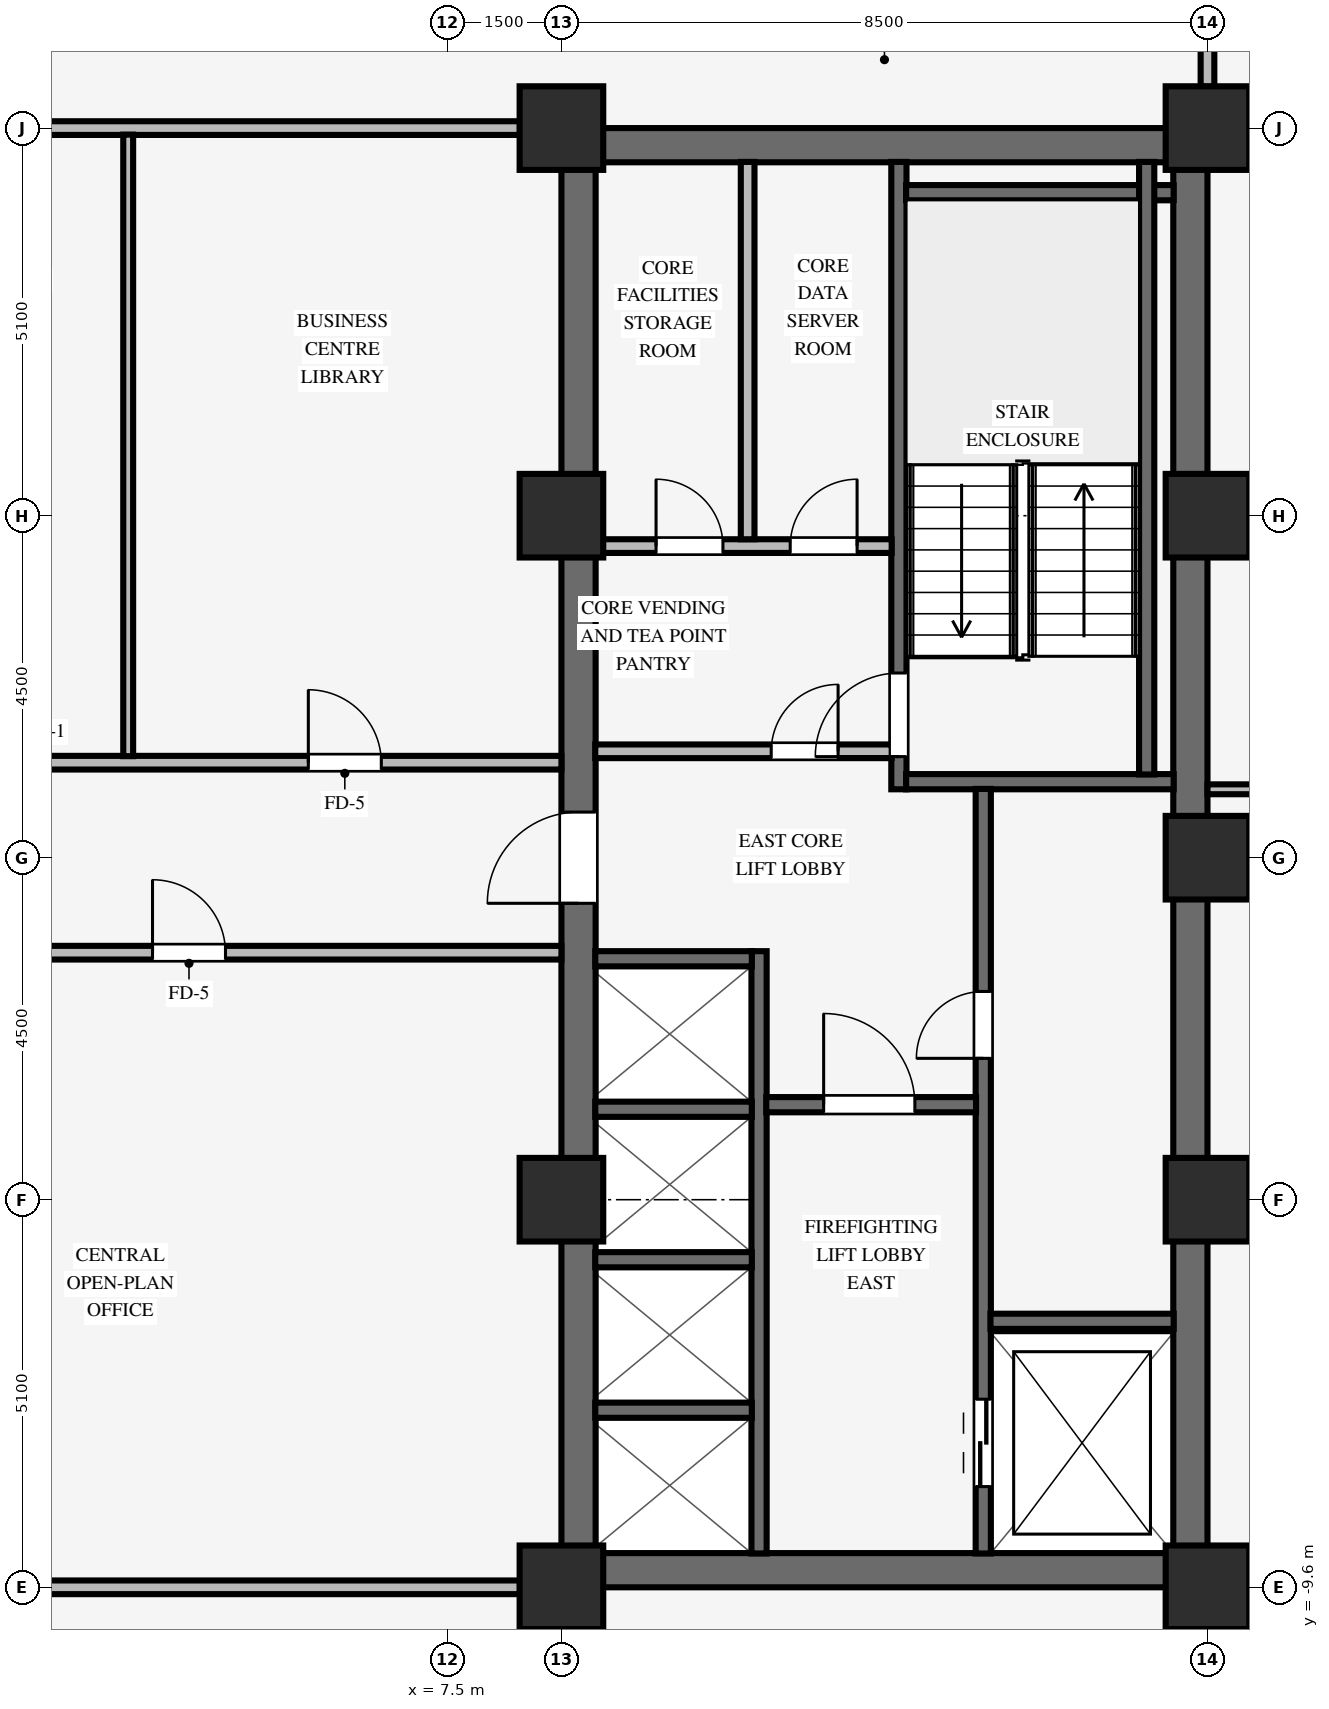
"""IFC4 building model, lengths in metres.
Left out: names, types, materials, properties, quantities, classifications, styles, units other than length and angle.
Written with IfcOpenShell. Run it as: python <this file> out.ifc"""

import sys

from ifc_helpers import new_model, si_unit, direction, frame, frame_2d, origin, origin_2d, place, context, subcontext, project, spatial, rectangle, extrude, source, transform, mapped, element, fill, save


model = new_model("IFC4")
c1 = context("Model", 3, precision=1e-05, world=origin(), true_north=direction((0.0, 1.0)))
c2 = subcontext(c1, "Body", "Model", "MODEL_VIEW")
j1 = project(units=[si_unit("LENGTHUNIT", "METRE"), si_unit("PLANEANGLEUNIT", "RADIAN")], contexts=[c1])
p1 = place(None, origin())
s1 = spatial("IfcSite", under=j1, at=p1, CompositionType="ELEMENT")
p2 = place(p1, origin())
s2 = spatial("IfcBuilding", under=s1, at=p2, CompositionType="ELEMENT")
p3 = place(p2, frame((0.0, 0.0, 86.0)))
s3 = spatial("IfcBuildingStorey", under=s2, at=p3, CompositionType="ELEMENT", Elevation=86.0)
for number, where, z_axis, x_axis in (
    (1, (9.0, -9.375, 0.0), (0.0, 0.0, 1.0), (1.0, 0.0, 0.0)),
    (2, (9.0, 9.375, 0.0), (0.0, 0.0, 1.0), (1.0, 0.0, 0.0)),
):
    element("IfcWall", number, at=place(p3, frame(where, z_axis=z_axis, x_axis=x_axis)), inside=s3, PredefinedType="SHEAR", context=c2, shape_type="SweptSolid", body=[
        extrude(rectangle(XDim=8.5, YDim=0.45, at=frame_2d((4.25, 0.0))), origin(), (0.0, 0.0, 1.0), 3.37),
    ])
p4 = place(p3, frame((9.225, -9.155, 0.0), z_axis=(0.0, 0.0, 1.0), x_axis=(0.0, 1.0, 0.0)))
e3 = element("IfcWall", 3, at=p4, inside=s3, PredefinedType="SHEAR", context=c2, shape_type="SweptSolid", body=[
    extrude(rectangle(XDim=18.31, YDim=0.45, at=frame_2d((9.155, 0.0))), origin(), (0.0, 0.0, 1.0), 3.37),
])
p5 = place(p4, frame((8.555, 0.0, 0.0)))
e4 = element("IfcOpeningElement", 4, at=p5, cuts=e3, PredefinedType="OPENING", context=c2, shape_type="SweptSolid", body=[
    extrude(rectangle(XDim=1.2, YDim=2.15, at=frame_2d((0.6, 1.075))), frame((0.0, 0.235, 0.0), z_axis=(0.0, -1.0, 0.0), x_axis=(1.0, 0.0, 0.0)), (0.0, 0.0, 1.0), 0.47),
])
p6 = place(p3, frame((17.275, -9.155, 0.0), z_axis=(0.0, 0.0, 1.0), x_axis=(0.0, 1.0, 0.0)))
e5 = element("IfcWall", 5, at=p6, inside=s3, PredefinedType="SHEAR", context=c2, shape_type="SweptSolid", body=[
    extrude(rectangle(XDim=18.31, YDim=0.45, at=frame_2d((9.155, 0.0))), origin(), (0.0, 0.0, 1.0), 3.37),
])
for number, where, z_axis, x_axis in (
    (6, (9.0, -9.6, 0.0), (0.0, 0.0, 1.0), (1.0, 0.0, 0.0)),
    (7, (9.0, -4.5, 0.0), (0.0, 0.0, 1.0), (1.0, 0.0, 0.0)),
    (8, (9.0, 4.5, 0.0), (0.0, 0.0, 1.0), (1.0, 0.0, 0.0)),
    (9, (9.0, 9.6, 0.0), (0.0, 0.0, 1.0), (1.0, 0.0, 0.0)),
    (10, (17.5, -9.6, 0.0), (0.0, 0.0, 1.0), (1.0, 0.0, 0.0)),
    (11, (17.5, -4.5, 0.0), (0.0, 0.0, 1.0), (1.0, 0.0, 0.0)),
    (12, (17.5, 4.5, 0.0), (0.0, 0.0, 1.0), (1.0, 0.0, 0.0)),
    (13, (17.5, 9.6, 0.0), (0.0, 0.0, 1.0), (1.0, 0.0, 0.0)),
    (14, (17.5, 0.0, 0.0), (0.0, 0.0, 1.0), (1.0, 0.0, 0.0)),
):
    element("IfcColumn", number, at=place(p3, frame(where, z_axis=z_axis, x_axis=x_axis)), inside=s3, PredefinedType="COLUMN", context=c2, shape_type="SweptSolid", body=[
        extrude(rectangle(XDim=1.1, YDim=1.1, at=origin_2d()), origin(), (0.0, 0.0, 1.0), 3.37),
    ])
p7 = place(p3, frame((13.44, 0.9, 0.0), z_axis=(0.0, 0.0, 1.0), x_axis=(0.0, 1.0, 0.0)))
e15 = element("IfcWall", 15, at=p7, inside=s3, PredefinedType="SHEAR", context=c2, shape_type="SweptSolid", body=[
    extrude(rectangle(XDim=8.255, YDim=0.2, at=frame_2d((4.127, 0.0))), origin(), (0.0, 0.0, 1.0), 3.37),
])
p8 = place(p7, frame((0.43, 0.0, 0.0)))
e16 = element("IfcOpeningElement", 16, at=p8, cuts=e15, PredefinedType="OPENING", context=c2, shape_type="SweptSolid", body=[
    extrude(rectangle(XDim=1.1, YDim=2.15, at=frame_2d((0.55, 1.075))), frame((0.0, 0.11, 0.0), z_axis=(0.0, -1.0, 0.0), x_axis=(1.0, 0.0, 0.0)), (0.0, 0.0, 1.0), 0.22),
])
for number, where, z_axis, x_axis in (
    (17, (13.535, 1.0, 0.0), (0.0, 0.0, 1.0), (1.0, 0.0, 0.0)),
    (18, (13.535, 8.75, 0.0), (0.0, 0.0, 1.0), (1.0, 0.0, 0.0)),
):
    element("IfcWall", number, at=place(p3, frame(where, z_axis=z_axis, x_axis=x_axis)), inside=s3, PredefinedType="SHEAR", context=c2, shape_type="SweptSolid", body=[
        extrude(rectangle(XDim=3.52, YDim=0.2, at=frame_2d((1.76, 0.0))), origin(), (0.0, 0.0, 1.0), 3.37),
    ])
p9 = place(p3, frame((16.7, 1.095, 0.0), z_axis=(0.0, 0.0, 1.0), x_axis=(0.0, 1.0, 0.0)))
e19 = element("IfcWall", 19, at=p9, inside=s3, PredefinedType="SHEAR", context=c2, shape_type="SweptSolid", body=[
    extrude(rectangle(XDim=8.06, YDim=0.2, at=frame_2d((4.03, 0.0))), origin(), (0.0, 0.0, 1.0), 3.37),
])
p10 = place(p3, frame((14.55, -9.155, 0.0), z_axis=(0.0, 0.0, 1.0), x_axis=(0.0, 1.0, 0.0)))
e20 = element("IfcWall", 20, at=p10, inside=s3, PredefinedType="SHEAR", context=c2, shape_type="SweptSolid", body=[
    extrude(rectangle(XDim=10.06, YDim=0.2, at=frame_2d((5.03, 0.0))), origin(), (0.0, 0.0, 1.0), 3.37),
])
p11 = place(p10, frame((6.515, 0.0, 0.0)))
e21 = element("IfcOpeningElement", 21, at=p11, cuts=e20, PredefinedType="OPENING", context=c2, shape_type="SweptSolid", body=[
    extrude(rectangle(XDim=0.88, YDim=2.1, at=frame_2d((0.44, 1.05))), frame((0.0, 0.11, 0.0), z_axis=(0.0, -1.0, 0.0), x_axis=(1.0, 0.0, 0.0)), (0.0, 0.0, 1.0), 0.22),
])
p12 = place(p10, frame((0.88, 0.0, 0.0)))
e22 = element("IfcOpeningElement", 22, at=p12, cuts=e20, PredefinedType="OPENING", context=c2, shape_type="SweptSolid", body=[
    extrude(rectangle(XDim=1.15, YDim=2.15, at=frame_2d((0.575, 1.075))), frame((0.0, 0.11, 0.0), z_axis=(0.0, -1.0, 0.0), x_axis=(1.0, 0.0, 0.0)), (0.0, 0.0, 1.0), 0.22),
])
p13 = place(p3, frame((14.645, -6.1, 0.0), z_axis=(0.0, 0.0, 1.0), x_axis=(1.0, 0.0, 0.0)))
e23 = element("IfcWall", 23, at=p13, inside=s3, PredefinedType="SHEAR", context=c2, shape_type="SweptSolid", body=[
    extrude(rectangle(XDim=2.41, YDim=0.2, at=frame_2d((1.205, 0.0))), origin(), (0.0, 0.0, 1.0), 3.37),
])
p14 = place(p3, frame((11.6, -9.155, 0.0), z_axis=(0.0, 0.0, 1.0), x_axis=(0.0, 1.0, 0.0)))
e24 = element("IfcWall", 24, at=p14, inside=s3, PredefinedType="SHEAR", context=c2, shape_type="SweptSolid", body=[
    extrude(rectangle(XDim=7.925, YDim=0.2, at=frame_2d((3.962, 0.0))), origin(), (0.0, 0.0, 1.0), 3.37),
])
p15 = place(p3, frame((11.695, -3.25, 0.0), z_axis=(0.0, 0.0, 1.0), x_axis=(1.0, 0.0, 0.0)))
e25 = element("IfcWall", 25, at=p15, inside=s3, PredefinedType="SHEAR", context=c2, shape_type="SweptSolid", body=[
    extrude(rectangle(XDim=2.76, YDim=0.2, at=frame_2d((1.38, 0.0))), origin(), (0.0, 0.0, 1.0), 3.37),
])
p16 = place(p15, frame((0.755, 0.0, 0.0)))
e26 = element("IfcOpeningElement", 26, at=p16, cuts=e25, PredefinedType="OPENING", context=c2, shape_type="SweptSolid", body=[
    extrude(rectangle(XDim=1.2, YDim=2.15, at=frame_2d((0.6, 1.075))), frame((0.0, 0.11, 0.0), z_axis=(0.0, -1.0, 0.0), x_axis=(1.0, 0.0, 0.0)), (0.0, 0.0, 1.0), 0.22),
])
for number, where, z_axis, x_axis in (
    (27, (9.445, -7.27, 0.0), (0.0, 0.0, 1.0), (1.0, 0.0, 0.0)),
    (28, (9.445, -5.29, 0.0), (0.0, 0.0, 1.0), (1.0, 0.0, 0.0)),
    (29, (9.445, -3.31, 0.0), (0.0, 0.0, 1.0), (1.0, 0.0, 0.0)),
    (30, (9.445, -1.33, 0.0), (0.0, 0.0, 1.0), (1.0, 0.0, 0.0)),
):
    element("IfcWall", number, at=place(p3, frame(where, z_axis=z_axis, x_axis=x_axis)), inside=s3, PredefinedType="SHEAR", context=c2, shape_type="SweptSolid", body=[
        extrude(rectangle(XDim=2.06, YDim=0.2, at=frame_2d((1.03, 0.0))), origin(), (0.0, 0.0, 1.0), 3.37),
    ])
p17 = place(p3, frame((9.445, 1.4, 0.0), z_axis=(0.0, 0.0, 1.0), x_axis=(1.0, 0.0, 0.0)))
e31 = element("IfcWall", 31, at=p17, inside=s3, PredefinedType="PARTITIONING", context=c2, shape_type="SweptSolid", body=[
    extrude(rectangle(XDim=3.9, YDim=0.18, at=frame_2d((1.95, 0.0))), origin(), (0.0, 0.0, 1.0), 3.36),
])
p18 = place(p17, frame((2.315, 0.0, 0.0)))
e32 = element("IfcOpeningElement", 32, at=p18, cuts=e31, PredefinedType="OPENING", context=c2, shape_type="SweptSolid", body=[
    extrude(rectangle(XDim=0.88, YDim=2.1, at=frame_2d((0.44, 1.05))), frame((0.0, 0.1, 0.0), z_axis=(0.0, -1.0, 0.0), x_axis=(1.0, 0.0, 0.0)), (0.0, 0.0, 1.0), 0.2),
])
p19 = place(p3, frame((9.445, 4.1, 0.0), z_axis=(0.0, 0.0, 1.0), x_axis=(1.0, 0.0, 0.0)))
e33 = element("IfcWall", 33, at=p19, inside=s3, PredefinedType="PARTITIONING", context=c2, shape_type="SweptSolid", body=[
    extrude(rectangle(XDim=3.9, YDim=0.18, at=frame_2d((1.95, 0.0))), origin(), (0.0, 0.0, 1.0), 3.36),
])
p20 = place(p19, frame((0.8, 0.0, 0.0)))
e34 = element("IfcOpeningElement", 34, at=p20, cuts=e33, PredefinedType="OPENING", context=c2, shape_type="SweptSolid", body=[
    extrude(rectangle(XDim=0.88, YDim=2.1, at=frame_2d((0.44, 1.05))), frame((0.0, 0.1, 0.0), z_axis=(0.0, -1.0, 0.0), x_axis=(1.0, 0.0, 0.0)), (0.0, 0.0, 1.0), 0.2),
])
p21 = place(p19, frame((2.565, 0.0, 0.0)))
e35 = element("IfcOpeningElement", 35, at=p21, cuts=e33, PredefinedType="OPENING", context=c2, shape_type="SweptSolid", body=[
    extrude(rectangle(XDim=0.88, YDim=2.1, at=frame_2d((0.44, 1.05))), frame((0.0, 0.1, 0.0), z_axis=(0.0, -1.0, 0.0), x_axis=(1.0, 0.0, 0.0)), (0.0, 0.0, 1.0), 0.2),
])
p22 = place(p3, frame((11.45, 4.19, 0.0), z_axis=(0.0, 0.0, 1.0), x_axis=(0.0, 1.0, 0.0)))
e36 = element("IfcWall", 36, at=p22, inside=s3, PredefinedType="PARTITIONING", context=c2, shape_type="SweptSolid", body=[
    extrude(rectangle(XDim=4.965, YDim=0.18, at=frame_2d((2.482, 0.0))), origin(), (0.0, 0.0, 1.0), 3.36),
])
p23 = place(p3, frame((0.176, -9.6, 0.0), z_axis=(0.0, 0.0, 1.0), x_axis=(1.0, 0.0, 0.0)))
e37 = element("IfcWall", 37, at=p23, inside=s3, PredefinedType="PARTITIONING", context=c2, shape_type="SweptSolid", body=[
    extrude(rectangle(XDim=8.278, YDim=0.18, at=frame_2d((4.139, 0.0))), origin(), (0.0, 0.0, 1.0), 2.405),
])
p24 = place(p3, frame((-0.8, -1.25, 0.0), z_axis=(0.0, 0.0, 1.0), x_axis=(1.0, 0.0, 0.0)))
e38 = element("IfcWall", 38, at=p24, inside=s3, PredefinedType="PARTITIONING", context=c2, shape_type="SweptSolid", body=[
    extrude(rectangle(XDim=9.8, YDim=0.18, at=frame_2d((4.9, 0.0))), origin(), (0.0, 0.0, 1.0), 3.36),
])
p25 = place(p24, frame((4.42, 0.0, 0.0)))
e39 = element("IfcOpeningElement", 39, at=p25, cuts=e38, PredefinedType="OPENING", context=c2, shape_type="SweptSolid", body=[
    extrude(rectangle(XDim=0.96, YDim=2.1, at=frame_2d((0.48, 1.05))), frame((0.0, 0.1, 0.0), z_axis=(0.0, -1.0, 0.0), x_axis=(1.0, 0.0, 0.0)), (0.0, 0.0, 1.0), 0.2),
])
p26 = place(p3, frame((17.5, 0.9, 0.0), z_axis=(0.0, 0.0, 1.0), x_axis=(1.0, 0.0, 0.0)))
e40 = element("IfcWall", 40, at=p26, inside=s3, PredefinedType="PARTITIONING", context=c2, shape_type="SweptSolid", body=[
    extrude(rectangle(XDim=6.18, YDim=0.13, at=frame_2d((3.09, 0.0))), origin(), (0.0, 0.0, 1.0), 3.36),
])
p27 = place(p3, frame((-0.8, 1.25, 0.0), z_axis=(0.0, 0.0, 1.0), x_axis=(1.0, 0.0, 0.0)))
e41 = element("IfcWall", 41, at=p27, inside=s3, PredefinedType="PARTITIONING", context=c2, shape_type="SweptSolid", body=[
    extrude(rectangle(XDim=9.8, YDim=0.18, at=frame_2d((4.9, 0.0))), origin(), (0.0, 0.0, 1.0), 3.36),
])
p28 = place(p27, frame((6.47, 0.0, 0.0)))
e42 = element("IfcOpeningElement", 42, at=p28, cuts=e41, PredefinedType="OPENING", context=c2, shape_type="SweptSolid", body=[
    extrude(rectangle(XDim=0.96, YDim=2.1, at=frame_2d((0.48, 1.05))), frame((0.0, 0.1, 0.0), z_axis=(0.0, -1.0, 0.0), x_axis=(1.0, 0.0, 0.0)), (0.0, 0.0, 1.0), 0.2),
])
p29 = place(p3, frame((0.176, 9.6, 0.0), z_axis=(0.0, 0.0, 1.0), x_axis=(1.0, 0.0, 0.0)))
e43 = element("IfcWall", 43, at=p29, inside=s3, PredefinedType="PARTITIONING", context=c2, shape_type="SweptSolid", body=[
    extrude(rectangle(XDim=8.278, YDim=0.18, at=frame_2d((4.139, 0.0))), origin(), (0.0, 0.0, 1.0), 2.405),
])
p30 = place(p3, frame((3.3, 1.336, 0.0), z_axis=(0.0, 0.0, 1.0), x_axis=(0.0, 1.0, 0.0)))
e44 = element("IfcWall", 44, at=p30, inside=s3, PredefinedType="PARTITIONING", context=c2, shape_type="SweptSolid", body=[
    extrude(rectangle(XDim=8.178, YDim=0.13, at=frame_2d((4.089, 0.0))), origin(), (0.0, 0.0, 1.0), 3.36),
])
for number, where, z_axis, x_axis in (
    (45, (17.5, -11.114, 0.0), (0.0, 0.0, 1.0), (0.0, 1.0, 0.0)),
    (46, (17.5, 10.146, 0.0), (0.0, 0.0, 1.0), (0.0, 1.0, 0.0)),
):
    element("IfcWall", number, at=place(p3, frame(where, z_axis=z_axis, x_axis=x_axis)), inside=s3, PredefinedType="PARTITIONING", context=c2, shape_type="SweptSolid", body=[
        extrude(rectangle(XDim=0.968, YDim=0.18, at=frame_2d((0.484, 0.0))), origin(), (0.0, 0.0, 1.0), 2.738),
    ])
m1 = source(origin(), c2, "Body", "SweptSolid", [
    extrude(rectangle(XDim=1.1, YDim=2.15, at=frame_2d((0.55, 1.075))), frame((0.0, 0.025, 0.0), z_axis=(0.0, -1.0, 0.0), x_axis=(1.0, 0.0, 0.0)), (0.0, 0.0, 1.0), 0.05),
])
p31 = place(p8, origin())
e47 = element("IfcDoor", 47, at=p31, inside=s3, OperationType="SINGLE_SWING_LEFT", PredefinedType="DOOR", context=c2, shape_type="MappedRepresentation", body=[
    mapped(m1, transform((0.0, 0.0, 0.0), scale=1.0)),
])
fill(e16, e47)
m2 = source(origin(), c2, "Body", "SweptSolid", [
    extrude(rectangle(XDim=0.88, YDim=2.1, at=frame_2d((0.44, 1.05))), frame((0.0, 0.025, 0.0), z_axis=(0.0, -1.0, 0.0), x_axis=(1.0, 0.0, 0.0)), (0.0, 0.0, 1.0), 0.05),
])
p32 = place(p11, origin())
e48 = element("IfcDoor", 48, at=p32, inside=s3, OperationType="SINGLE_SWING_LEFT", PredefinedType="DOOR", context=c2, shape_type="MappedRepresentation", body=[
    mapped(m2, transform((0.0, 0.0, 0.0), scale=1.0)),
])
fill(e21, e48)
m3 = source(origin(), c2, "Body", "SweptSolid", [
    extrude(rectangle(XDim=1.2, YDim=2.15, at=frame_2d((0.6, 1.075))), frame((0.0, 0.025, 0.0), z_axis=(0.0, -1.0, 0.0), x_axis=(1.0, 0.0, 0.0)), (0.0, 0.0, 1.0), 0.05),
])
p33 = place(p16, origin())
e49 = element("IfcDoor", 49, at=p33, inside=s3, OperationType="SINGLE_SWING_LEFT", PredefinedType="DOOR", context=c2, shape_type="MappedRepresentation", body=[
    mapped(m3, transform((0.0, 0.0, 0.0), scale=1.0)),
])
fill(e26, e49)
p34 = place(p5, origin())
e50 = element("IfcDoor", 50, at=p34, inside=s3, OperationType="SINGLE_SWING_LEFT", PredefinedType="DOOR", context=c2, shape_type="MappedRepresentation", body=[
    mapped(m3, transform((0.0, 0.0, 0.0), scale=1.0)),
])
fill(e4, e50)
p35 = place(p18, origin())
e51 = element("IfcDoor", 51, at=p35, inside=s3, OperationType="SINGLE_SWING_RIGHT", PredefinedType="DOOR", context=c2, shape_type="MappedRepresentation", body=[
    mapped(m2, transform((0.0, 0.0, 0.0), scale=1.0)),
])
fill(e32, e51)
p36 = place(p20, origin())
e52 = element("IfcDoor", 52, at=p36, inside=s3, OperationType="SINGLE_SWING_LEFT", PredefinedType="DOOR", context=c2, shape_type="MappedRepresentation", body=[
    mapped(m2, transform((0.0, 0.0, 0.0), scale=1.0)),
])
fill(e34, e52)
p37 = place(p21, origin())
e53 = element("IfcDoor", 53, at=p37, inside=s3, OperationType="SINGLE_SWING_RIGHT", PredefinedType="DOOR", context=c2, shape_type="MappedRepresentation", body=[
    mapped(m2, transform((0.0, 0.0, 0.0), scale=1.0)),
])
fill(e35, e53)
m4 = source(origin(), c2, "Body", "SweptSolid", [
    extrude(rectangle(XDim=1.15, YDim=2.15, at=frame_2d((0.575, 1.075))), frame((0.0, 0.025, 0.0), z_axis=(0.0, -1.0, 0.0), x_axis=(1.0, 0.0, 0.0)), (0.0, 0.0, 1.0), 0.05),
])
p38 = place(p12, origin())
e54 = element("IfcDoor", 54, at=p38, inside=s3, OperationType="DOUBLE_DOOR_SLIDING", PredefinedType="DOOR", context=c2, shape_type="MappedRepresentation", body=[
    mapped(m4, transform((0.0, 0.0, 0.0), scale=1.0)),
])
fill(e22, e54)
m5 = source(origin(), c2, "Body", "SweptSolid", [
    extrude(rectangle(XDim=0.96, YDim=2.1, at=frame_2d((0.48, 1.05))), frame((0.0, 0.025, 0.0), z_axis=(0.0, -1.0, 0.0), x_axis=(1.0, 0.0, 0.0)), (0.0, 0.0, 1.0), 0.05),
])
p39 = place(p25, origin())
e55 = element("IfcDoor", 55, at=p39, inside=s3, OperationType="SINGLE_SWING_LEFT", PredefinedType="DOOR", context=c2, shape_type="MappedRepresentation", body=[
    mapped(m5, transform((0.0, 0.0, 0.0), scale=1.0)),
])
fill(e39, e55)
p40 = place(p28, origin())
e56 = element("IfcDoor", 56, at=p40, inside=s3, OperationType="SINGLE_SWING_LEFT", PredefinedType="DOOR", context=c2, shape_type="MappedRepresentation", body=[
    mapped(m5, transform((0.0, 0.0, 0.0), scale=1.0)),
])
fill(e42, e56)
save(model, sys.argv[1])
